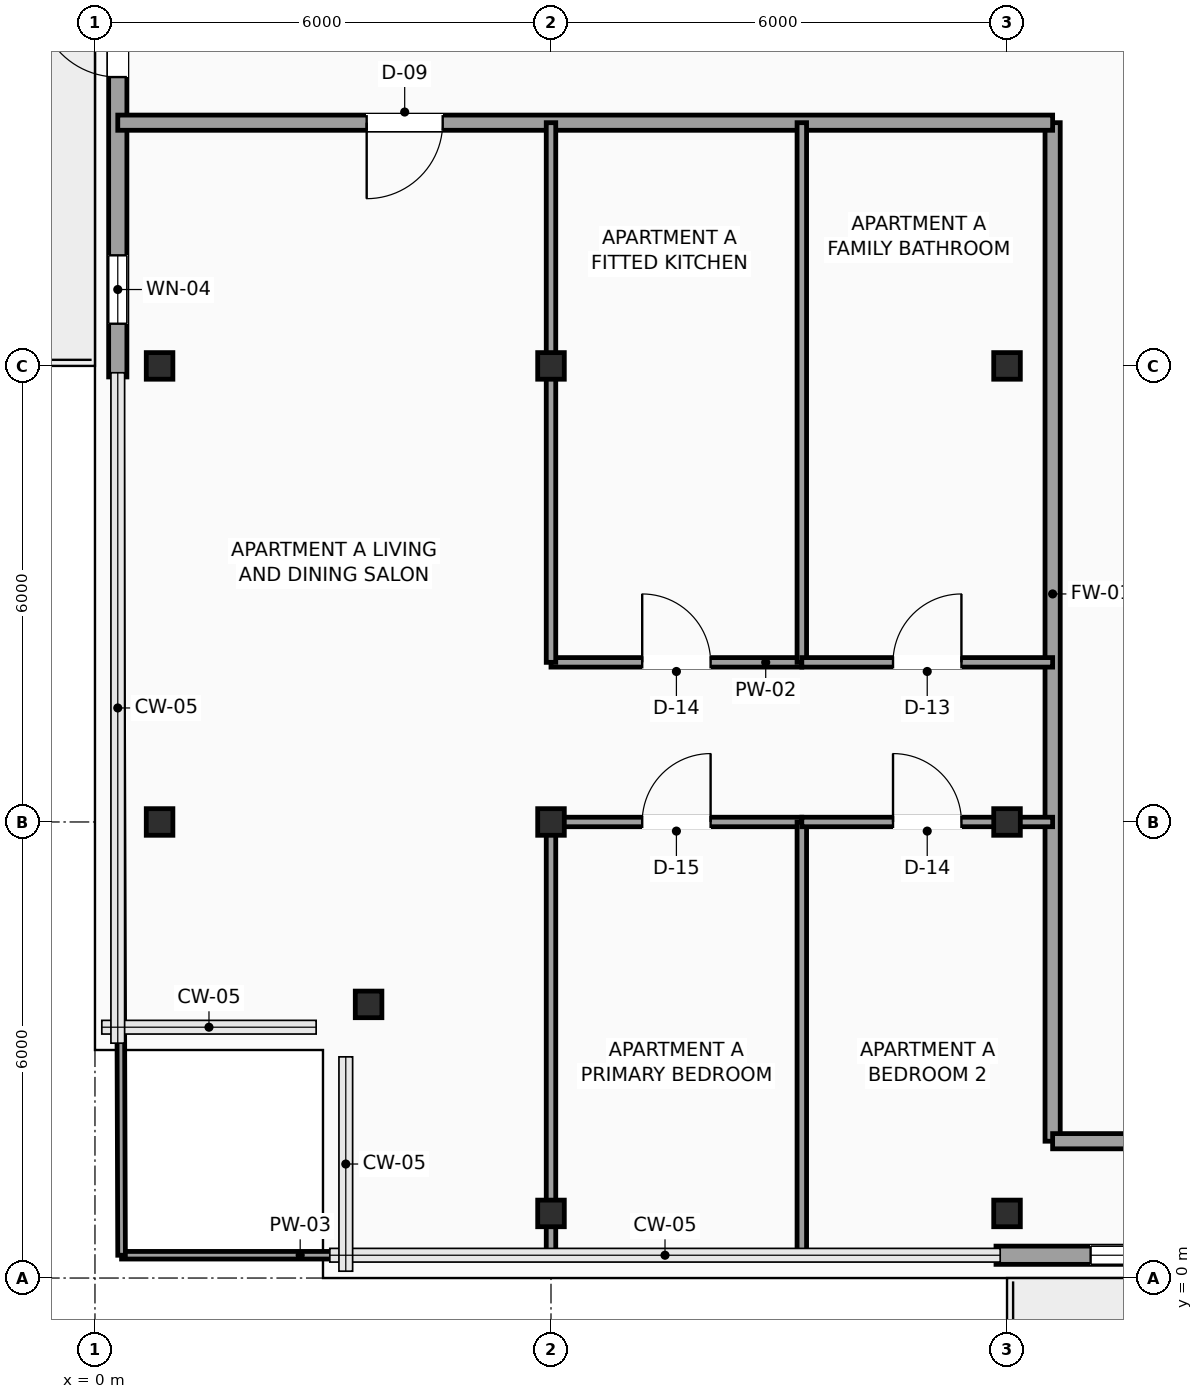
"""IFC4 building model, lengths in metres.
Left out: names, types, materials, properties, quantities, classifications, styles, units other than length and angle.
Written with IfcOpenShell. Run it as: python <this file> out.ifc"""

import sys

from ifc_helpers import new_model, si_unit, direction, frame, frame_2d, origin, origin_2d, place, context, subcontext, project, spatial, rectangle, hollow_rectangle, extrude, element, fill, save


model = new_model("IFC4")
c1 = context("Model", 3, precision=1e-05, world=origin(), true_north=direction((0.0, 1.0)))
c2 = subcontext(c1, "Body", "Model", "MODEL_VIEW")
j1 = project(units=[si_unit("LENGTHUNIT", "METRE"), si_unit("PLANEANGLEUNIT", "RADIAN")], contexts=[c1])
p1 = place(None, origin())
s1 = spatial("IfcSite", under=j1, at=p1, CompositionType="ELEMENT")
p2 = place(p1, origin())
s2 = spatial("IfcBuilding", under=s1, at=p2, CompositionType="ELEMENT")
p3 = place(p2, frame((0.0, 0.0, 253.7)))
s3 = spatial("IfcBuildingStorey", under=s2, at=p3, CompositionType="ELEMENT", Elevation=253.7)
for number, where, z_axis, x_axis in (
    (1, (3.6, 3.6, 0.0), (0.0, 0.0, 1.0), (1.0, 0.0, 0.0)),
    (2, (0.85, 6.0, 0.0), (0.0, 0.0, 1.0), (1.0, 0.0, 0.0)),
    (3, (0.85, 12.0, 0.0), (0.0, 0.0, 1.0), (1.0, 0.0, 0.0)),
    (4, (6.0, 0.85, 0.0), (0.0, 0.0, 1.0), (1.0, 0.0, 0.0)),
    (5, (6.0, 6.0, 0.0), (0.0, 0.0, 1.0), (1.0, 0.0, 0.0)),
    (6, (6.0, 12.0, 0.0), (0.0, 0.0, 1.0), (1.0, 0.0, 0.0)),
    (7, (12.0, 0.85, 0.0), (0.0, 0.0, 1.0), (1.0, 0.0, 0.0)),
    (8, (12.0, 6.0, 0.0), (0.0, 0.0, 1.0), (1.0, 0.0, 0.0)),
    (9, (12.0, 12.0, 0.0), (0.0, 0.0, 1.0), (1.0, 0.0, 0.0)),
):
    element("IfcColumn", number, at=place(p3, frame(where, z_axis=z_axis, x_axis=x_axis)), inside=s3, PredefinedType="COLUMN", context=c2, shape_type="SweptSolid", body=[
        extrude(hollow_rectangle(XDim=0.35, YDim=0.35, WallThickness=0.016, InnerFilletRadius=0.016, OuterFilletRadius=0.032, at=origin_2d()), origin(), (0.0, 0.0, 1.0), 3.5),
    ])
p4 = place(p3, frame((21.145, 0.3, 0.0), z_axis=(0.0, 0.0, 1.0), x_axis=(-1.0, 0.0, 0.0)))
e10 = element("IfcWall", 10, at=p4, inside=s3, PredefinedType="SOLIDWALL", context=c2, shape_type="SweptSolid", body=[
    extrude(rectangle(XDim=9.29, YDim=0.24, at=frame_2d((4.645, 0.0))), origin(), (0.0, 0.0, 1.0), 3.3),
])
p5 = place(p4, frame((3.945, 0.0, 0.0)))
e11 = element("IfcOpeningElement", 11, at=p5, cuts=e10, PredefinedType="OPENING", context=c2, shape_type="SweptSolid", body=[
    extrude(rectangle(XDim=1.05, YDim=2.2, at=frame_2d((0.525, 1.1))), frame((0.0, 0.13, 0.0), z_axis=(0.0, -1.0, 0.0), x_axis=(1.0, 0.0, 0.0)), (0.0, 0.0, 1.0), 0.26),
])
p6 = place(p4, frame((5.345, 0.0, 0.6)))
e12 = element("IfcOpeningElement", 12, at=p6, cuts=e10, PredefinedType="OPENING", context=c2, shape_type="SweptSolid", body=[
    extrude(rectangle(XDim=2.7, YDim=2.3, at=frame_2d((1.35, 1.15))), frame((0.0, 0.13, 0.0), z_axis=(0.0, -1.0, 0.0), x_axis=(1.0, 0.0, 0.0)), (0.0, 0.0, 1.0), 0.26),
])
p7 = place(p4, frame((1.4, 0.0, 0.6)))
e13 = element("IfcOpeningElement", 13, at=p7, cuts=e10, PredefinedType="OPENING", context=c2, shape_type="SweptSolid", body=[
    extrude(rectangle(XDim=0.9, YDim=2.2, at=frame_2d((0.45, 1.1))), frame((0.0, 0.13, 0.0), z_axis=(0.0, -1.0, 0.0), x_axis=(1.0, 0.0, 0.0)), (0.0, 0.0, 1.0), 0.26),
])
p8 = place(p3, frame((0.3, 11.855, 0.0), z_axis=(0.0, 0.0, 1.0), x_axis=(0.0, 1.0, 0.0)))
e14 = element("IfcWall", 14, at=p8, inside=s3, PredefinedType="SOLIDWALL", context=c2, shape_type="SweptSolid", body=[
    extrude(rectangle(XDim=9.29, YDim=0.24, at=frame_2d((4.645, 0.0))), origin(), (0.0, 0.0, 1.0), 3.3),
])
p9 = place(p8, frame((3.945, 0.0, 0.0)))
e15 = element("IfcOpeningElement", 15, at=p9, cuts=e14, PredefinedType="OPENING", context=c2, shape_type="SweptSolid", body=[
    extrude(rectangle(XDim=1.05, YDim=2.2, at=frame_2d((0.525, 1.1))), frame((0.0, 0.13, 0.0), z_axis=(0.0, -1.0, 0.0), x_axis=(1.0, 0.0, 0.0)), (0.0, 0.0, 1.0), 0.26),
])
p10 = place(p8, frame((6.2, 0.0, 0.6)))
e16 = element("IfcOpeningElement", 16, at=p10, cuts=e14, PredefinedType="OPENING", context=c2, shape_type="SweptSolid", body=[
    extrude(rectangle(XDim=2.7, YDim=2.3, at=frame_2d((1.35, 1.15))), frame((0.0, 0.13, 0.0), z_axis=(0.0, -1.0, 0.0), x_axis=(1.0, 0.0, 0.0)), (0.0, 0.0, 1.0), 0.26),
])
p11 = place(p8, frame((0.7, 0.0, 0.6)))
e17 = element("IfcOpeningElement", 17, at=p11, cuts=e14, PredefinedType="OPENING", context=c2, shape_type="SweptSolid", body=[
    extrude(rectangle(XDim=0.9, YDim=2.2, at=frame_2d((0.45, 1.1))), frame((0.0, 0.13, 0.0), z_axis=(0.0, -1.0, 0.0), x_axis=(1.0, 0.0, 0.0)), (0.0, 0.0, 1.0), 0.26),
])
p12 = place(p3, frame((12.6, 1.8, 0.0), z_axis=(0.0, 0.0, 1.0), x_axis=(0.0, 1.0, 0.0)))
e18 = element("IfcWall", 18, at=p12, inside=s3, PredefinedType="SOLIDWALL", context=c2, shape_type="SweptSolid", body=[
    extrude(rectangle(XDim=13.4, YDim=0.2, at=frame_2d((6.7, 0.0))), origin(), (0.0, 0.0, 1.0), 3.3),
])
p13 = place(p3, frame((12.6, 15.2, 0.0), z_axis=(0.0, 0.0, 1.0), x_axis=(-1.0, 0.0, 0.0)))
e19 = element("IfcWall", 19, at=p13, inside=s3, PredefinedType="SOLIDWALL", context=c2, shape_type="SweptSolid", body=[
    extrude(rectangle(XDim=12.3, YDim=0.2, at=frame_2d((6.15, 0.0))), origin(), (0.0, 0.0, 1.0), 2.932),
])
p14 = place(p13, frame((8.025, 0.0, 0.0)))
e20 = element("IfcOpeningElement", 20, at=p14, cuts=e19, PredefinedType="OPENING", context=c2, shape_type="SweptSolid", body=[
    extrude(rectangle(XDim=1.0, YDim=2.2, at=frame_2d((0.5, 1.1))), frame((0.0, 0.11, 0.0), z_axis=(0.0, -1.0, 0.0), x_axis=(1.0, 0.0, 0.0)), (0.0, 0.0, 1.0), 0.22),
])
p15 = place(p3, frame((14.95, 1.8, 0.0), z_axis=(0.0, 0.0, 1.0), x_axis=(-1.0, 0.0, 0.0)))
e21 = element("IfcWall", 21, at=p15, inside=s3, PredefinedType="SOLIDWALL", context=c2, shape_type="SweptSolid", body=[
    extrude(rectangle(XDim=2.35, YDim=0.2, at=frame_2d((1.175, 0.0))), origin(), (0.0, 0.0, 1.0), 3.3),
])
p16 = place(p3, frame((0.35, 0.3, 0.0), z_axis=(0.0, 0.0, 1.0), x_axis=(1.0, 0.0, 0.0)))
e22 = element("IfcWall", 22, at=p16, inside=s3, PredefinedType="PARTITIONING", context=c2, shape_type="SweptSolid", body=[
    extrude(rectangle(XDim=11.505, YDim=0.1, at=frame_2d((5.752, 0.0))), origin(), (0.0, 0.0, 1.0), 3.3),
])
p17 = place(p3, frame((0.35, 0.3, 0.0), z_axis=(0.0, 0.0, 1.0), x_axis=(-0.003359443529, 0.999994357054, 0.0)))
e23 = element("IfcWall", 23, at=p17, inside=s3, PredefinedType="PARTITIONING", context=c2, shape_type="SweptSolid", body=[
    extrude(rectangle(XDim=11.555, YDim=0.1, at=frame_2d((5.777, 0.0))), origin(), (0.0, 0.0, 1.0), 3.3),
])
p18 = place(p3, frame((6.0, 8.1, 0.0), z_axis=(0.0, 0.0, 1.0), x_axis=(1.0, 0.0, 0.0)))
e24 = element("IfcWall", 24, at=p18, inside=s3, PredefinedType="PARTITIONING", context=c2, shape_type="SweptSolid", body=[
    extrude(rectangle(XDim=3.3, YDim=0.125, at=frame_2d((1.65, 0.0))), origin(), (0.0, 0.0, 1.0), 3.3),
])
p19 = place(p18, frame((1.2, 0.0, 0.0)))
e25 = element("IfcOpeningElement", 25, at=p19, cuts=e24, PredefinedType="OPENING", context=c2, shape_type="SweptSolid", body=[
    extrude(rectangle(XDim=0.9, YDim=2.1, at=frame_2d((0.45, 1.05))), frame((0.0, 0.073, 0.0), z_axis=(0.0, -1.0, 0.0), x_axis=(1.0, 0.0, 0.0)), (0.0, 0.0, 1.0), 0.145),
])
p20 = place(p3, frame((6.0, 8.1, 0.0), z_axis=(0.0, 0.0, 1.0), x_axis=(0.0, 1.0, 0.0)))
e26 = element("IfcWall", 26, at=p20, inside=s3, PredefinedType="PARTITIONING", context=c2, shape_type="SweptSolid", body=[
    extrude(rectangle(XDim=7.1, YDim=0.125, at=frame_2d((3.55, 0.0))), origin(), (0.0, 0.0, 1.0), 2.992),
])
p21 = place(p3, frame((9.3, 8.1, 0.0), z_axis=(0.0, 0.0, 1.0), x_axis=(0.0, 1.0, 0.0)))
e27 = element("IfcWall", 27, at=p21, inside=s3, PredefinedType="PARTITIONING", context=c2, shape_type="SweptSolid", body=[
    extrude(rectangle(XDim=7.1, YDim=0.125, at=frame_2d((3.55, 0.0))), origin(), (0.0, 0.0, 1.0), 3.3),
])
p22 = place(p3, frame((9.3, 8.1, 0.0), z_axis=(0.0, 0.0, 1.0), x_axis=(1.0, 0.0, 0.0)))
e28 = element("IfcWall", 28, at=p22, inside=s3, PredefinedType="PARTITIONING", context=c2, shape_type="SweptSolid", body=[
    extrude(rectangle(XDim=3.3, YDim=0.125, at=frame_2d((1.65, 0.0))), origin(), (0.0, 0.0, 1.0), 3.3),
])
p23 = place(p22, frame((1.2, 0.0, 0.0)))
e29 = element("IfcOpeningElement", 29, at=p23, cuts=e28, PredefinedType="OPENING", context=c2, shape_type="SweptSolid", body=[
    extrude(rectangle(XDim=0.9, YDim=2.1, at=frame_2d((0.45, 1.05))), frame((0.0, 0.073, 0.0), z_axis=(0.0, -1.0, 0.0), x_axis=(1.0, 0.0, 0.0)), (0.0, 0.0, 1.0), 0.145),
])
p24 = place(p3, frame((6.0, 6.0, 0.0), z_axis=(0.0, 0.0, 1.0), x_axis=(1.0, 0.0, 0.0)))
e30 = element("IfcWall", 30, at=p24, inside=s3, PredefinedType="PARTITIONING", context=c2, shape_type="SweptSolid", body=[
    extrude(rectangle(XDim=3.3, YDim=0.125, at=frame_2d((1.65, 0.0))), origin(), (0.0, 0.0, 1.0), 2.992),
])
p25 = place(p24, frame((1.2, 0.0, 0.0)))
e31 = element("IfcOpeningElement", 31, at=p25, cuts=e30, PredefinedType="OPENING", context=c2, shape_type="SweptSolid", body=[
    extrude(rectangle(XDim=0.9, YDim=2.1, at=frame_2d((0.45, 1.05))), frame((0.0, 0.073, 0.0), z_axis=(0.0, -1.0, 0.0), x_axis=(1.0, 0.0, 0.0)), (0.0, 0.0, 1.0), 0.145),
])
p26 = place(p3, frame((6.0, 0.3, 0.0), z_axis=(0.0, 0.0, 1.0), x_axis=(0.0, 1.0, 0.0)))
e32 = element("IfcWall", 32, at=p26, inside=s3, PredefinedType="PARTITIONING", context=c2, shape_type="SweptSolid", body=[
    extrude(rectangle(XDim=5.7, YDim=0.125, at=frame_2d((2.85, 0.0))), origin(), (0.0, 0.0, 1.0), 2.992),
])
p27 = place(p3, frame((9.3, 0.3, 0.0), z_axis=(0.0, 0.0, 1.0), x_axis=(0.0, 1.0, 0.0)))
e33 = element("IfcWall", 33, at=p27, inside=s3, PredefinedType="PARTITIONING", context=c2, shape_type="SweptSolid", body=[
    extrude(rectangle(XDim=5.7, YDim=0.125, at=frame_2d((2.85, 0.0))), origin(), (0.0, 0.0, 1.0), 3.3),
])
p28 = place(p3, frame((9.3, 6.0, 0.0), z_axis=(0.0, 0.0, 1.0), x_axis=(1.0, 0.0, 0.0)))
e34 = element("IfcWall", 34, at=p28, inside=s3, PredefinedType="PARTITIONING", context=c2, shape_type="SweptSolid", body=[
    extrude(rectangle(XDim=3.3, YDim=0.125, at=frame_2d((1.65, 0.0))), origin(), (0.0, 0.0, 1.0), 2.992),
])
p29 = place(p28, frame((1.2, 0.0, 0.0)))
e35 = element("IfcOpeningElement", 35, at=p29, cuts=e34, PredefinedType="OPENING", context=c2, shape_type="SweptSolid", body=[
    extrude(rectangle(XDim=0.9, YDim=2.1, at=frame_2d((0.45, 1.05))), frame((0.0, 0.073, 0.0), z_axis=(0.0, -1.0, 0.0), x_axis=(1.0, 0.0, 0.0)), (0.0, 0.0, 1.0), 0.145),
])
p30 = place(p6, origin())
e36 = element("IfcWindow", 36, at=p30, inside=s3, PartitioningType="SINGLE_PANEL", PredefinedType="WINDOW", context=c2, shape_type="SweptSolid", body=[
    extrude(rectangle(XDim=2.7, YDim=2.3, at=frame_2d((1.35, 1.15))), frame((0.0, 0.03, 0.0), z_axis=(0.0, -1.0, 0.0), x_axis=(1.0, 0.0, 0.0)), (0.0, 0.0, 1.0), 0.06),
])
fill(e12, e36)
p31 = place(p9, origin())
e37 = element("IfcDoor", 37, at=p31, inside=s3, OperationType="SINGLE_SWING_RIGHT", PredefinedType="DOOR", context=c2, shape_type="SweptSolid", body=[
    extrude(rectangle(XDim=1.05, YDim=2.2, at=frame_2d((0.525, 1.1))), frame((0.0, 0.025, 0.0), z_axis=(0.0, -1.0, 0.0), x_axis=(1.0, 0.0, 0.0)), (0.0, 0.0, 1.0), 0.05),
])
fill(e15, e37)
p32 = place(p11, origin())
e38 = element("IfcWindow", 38, at=p32, inside=s3, PartitioningType="SINGLE_PANEL", PredefinedType="WINDOW", context=c2, shape_type="SweptSolid", body=[
    extrude(rectangle(XDim=0.9, YDim=2.2, at=frame_2d((0.45, 1.1))), frame((0.0, 0.03, 0.0), z_axis=(0.0, -1.0, 0.0), x_axis=(1.0, 0.0, 0.0)), (0.0, 0.0, 1.0), 0.06),
])
fill(e17, e38)
p33 = place(p14, origin())
e39 = element("IfcDoor", 39, at=p33, inside=s3, OperationType="SINGLE_SWING_RIGHT", PredefinedType="DOOR", context=c2, shape_type="SweptSolid", body=[
    extrude(rectangle(XDim=1.0, YDim=2.2, at=frame_2d((0.5, 1.1))), frame((0.0, 0.025, 0.0), z_axis=(0.0, -1.0, 0.0), x_axis=(1.0, 0.0, 0.0)), (0.0, 0.0, 1.0), 0.05),
])
fill(e20, e39)
p34 = place(p19, origin())
e40 = element("IfcDoor", 40, at=p34, inside=s3, OperationType="SINGLE_SWING_LEFT", PredefinedType="DOOR", context=c2, shape_type="SweptSolid", body=[
    extrude(rectangle(XDim=0.9, YDim=2.1, at=frame_2d((0.45, 1.05))), frame((0.0, 0.025, 0.0), z_axis=(0.0, -1.0, 0.0), x_axis=(1.0, 0.0, 0.0)), (0.0, 0.0, 1.0), 0.05),
])
fill(e25, e40)
p35 = place(p23, origin())
e41 = element("IfcDoor", 41, at=p35, inside=s3, OperationType="SINGLE_SWING_RIGHT", PredefinedType="DOOR", context=c2, shape_type="SweptSolid", body=[
    extrude(rectangle(XDim=0.9, YDim=2.1, at=frame_2d((0.45, 1.05))), frame((0.0, 0.025, 0.0), z_axis=(0.0, -1.0, 0.0), x_axis=(1.0, 0.0, 0.0)), (0.0, 0.0, 1.0), 0.05),
])
fill(e29, e41)
p36 = place(p25, origin())
e42 = element("IfcDoor", 42, at=p36, inside=s3, OperationType="SINGLE_SWING_RIGHT", PredefinedType="DOOR", context=c2, shape_type="SweptSolid", body=[
    extrude(rectangle(XDim=0.9, YDim=2.1, at=frame_2d((0.45, 1.05))), frame((0.0, 0.025, 0.0), z_axis=(0.0, -1.0, 0.0), x_axis=(1.0, 0.0, 0.0)), (0.0, 0.0, 1.0), 0.05),
])
fill(e31, e42)
p37 = place(p29, origin())
e43 = element("IfcDoor", 43, at=p37, inside=s3, OperationType="SINGLE_SWING_LEFT", PredefinedType="DOOR", context=c2, shape_type="SweptSolid", body=[
    extrude(rectangle(XDim=0.9, YDim=2.1, at=frame_2d((0.45, 1.05))), frame((0.0, 0.025, 0.0), z_axis=(0.0, -1.0, 0.0), x_axis=(1.0, 0.0, 0.0)), (0.0, 0.0, 1.0), 0.05),
])
fill(e35, e43)
save(model, sys.argv[1])
